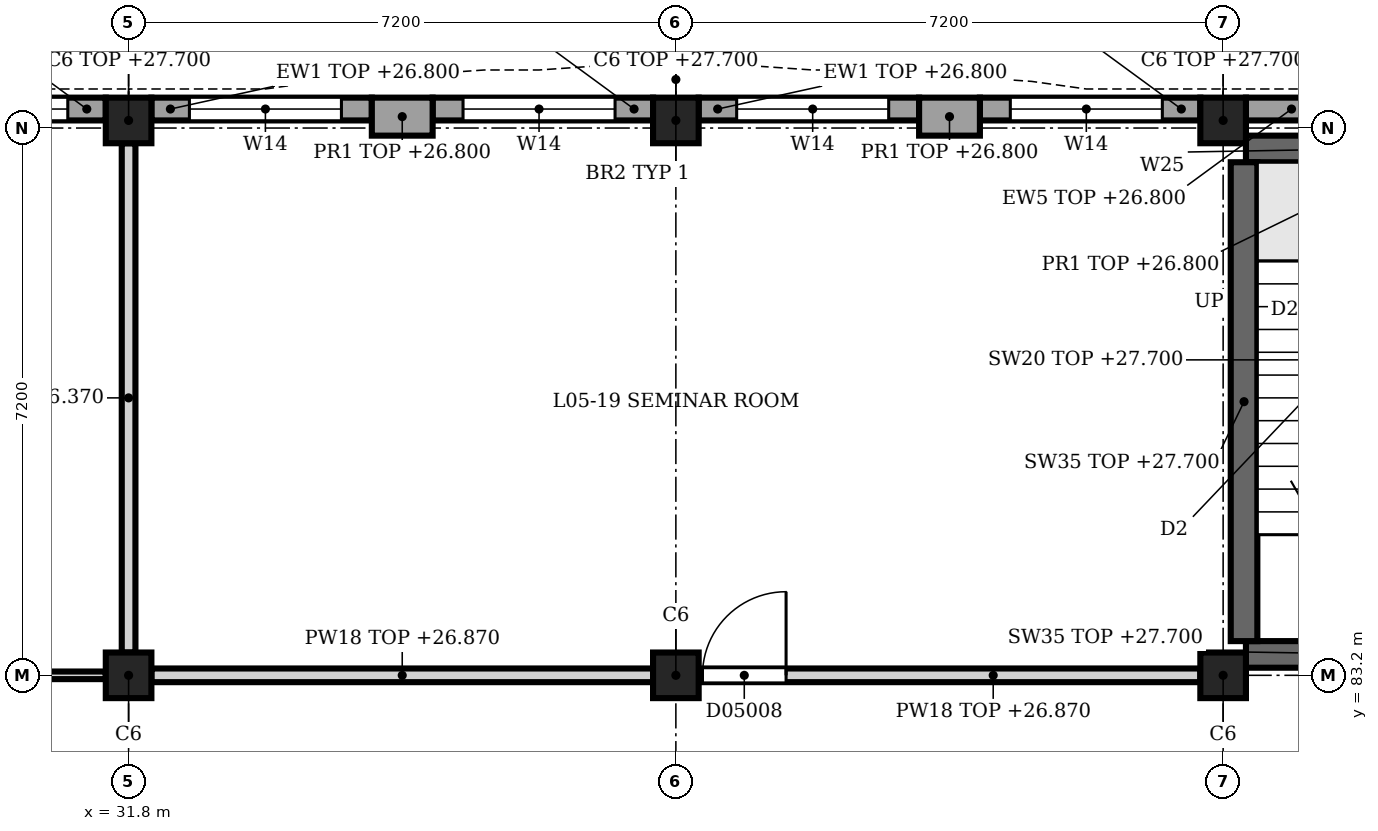
"""IFC4 building model, lengths in metres.
Left out: names, types, materials, properties, quantities, classifications, styles, units other than length and angle.
Written with IfcOpenShell. Run it as: python <this file> out.ifc"""

import sys

from ifc_helpers import new_model, si_unit, direction, frame, frame_2d, origin, origin_2d, place, context, subcontext, project, spatial, rectangle, extrude, element, fill, save


model = new_model("IFC4")
c1 = context("Model", 3, precision=1e-05, world=origin(), true_north=direction((0.0, 1.0)))
c2 = subcontext(c1, "Body", "Model", "MODEL_VIEW")
j1 = project(units=[si_unit("LENGTHUNIT", "METRE"), si_unit("PLANEANGLEUNIT", "RADIAN")], contexts=[c1])
p1 = place(None, origin())
s1 = spatial("IfcSite", under=j1, at=p1, CompositionType="ELEMENT")
p2 = place(p1, origin())
s2 = spatial("IfcBuilding", under=s1, at=p2, CompositionType="ELEMENT")
p3 = place(p2, frame((0.0, 0.0, 23.4)))
s3 = spatial("IfcBuildingStorey", under=s2, at=p3, CompositionType="ELEMENT", Elevation=23.4)
p4 = place(p3, frame((31.8, 83.2, 0.0), z_axis=(0.0, 0.0, 1.0), x_axis=(1.0, 0.0, 0.0)))
e1 = element("IfcColumn", 1, at=p4, inside=s3, PredefinedType="COLUMN", context=c2, shape_type="SweptSolid", body=[
    extrude(rectangle(XDim=0.6, YDim=0.6, at=origin_2d()), origin(), (0.0, 0.0, 1.0), 4.5),
])
p5 = place(p3, frame((31.8, 90.5, 0.0), z_axis=(0.0, 0.0, 1.0), x_axis=(1.0, 0.0, 0.0)))
e2 = element("IfcColumn", 2, at=p5, inside=s3, PredefinedType="COLUMN", context=c2, shape_type="SweptSolid", body=[
    extrude(rectangle(XDim=0.6, YDim=0.6, at=origin_2d()), origin(), (0.0, 0.0, 1.0), 4.3),
])
p6 = place(p3, frame((39.0, 83.2, 0.0), z_axis=(0.0, 0.0, 1.0), x_axis=(1.0, 0.0, 0.0)))
e3 = element("IfcColumn", 3, at=p6, inside=s3, PredefinedType="COLUMN", context=c2, shape_type="SweptSolid", body=[
    extrude(rectangle(XDim=0.6, YDim=0.6, at=origin_2d()), origin(), (0.0, 0.0, 1.0), 4.5),
])
p7 = place(p3, frame((39.0, 90.5, 0.0), z_axis=(0.0, 0.0, 1.0), x_axis=(1.0, 0.0, 0.0)))
e4 = element("IfcColumn", 4, at=p7, inside=s3, PredefinedType="COLUMN", context=c2, shape_type="SweptSolid", body=[
    extrude(rectangle(XDim=0.6, YDim=0.6, at=origin_2d()), origin(), (0.0, 0.0, 1.0), 4.3),
])
p8 = place(p3, frame((46.2, 83.2, 0.0), z_axis=(0.0, 0.0, 1.0), x_axis=(1.0, 0.0, 0.0)))
e5 = element("IfcColumn", 5, at=p8, inside=s3, PredefinedType="COLUMN", context=c2, shape_type="SweptSolid", body=[
    extrude(rectangle(XDim=0.6, YDim=0.6, at=origin_2d()), origin(), (0.0, 0.0, 1.0), 4.5),
])
p9 = place(p3, frame((46.2, 90.5, 0.0), z_axis=(0.0, 0.0, 1.0), x_axis=(1.0, 0.0, 0.0)))
e6 = element("IfcColumn", 6, at=p9, inside=s3, PredefinedType="COLUMN", context=c2, shape_type="SweptSolid", body=[
    extrude(rectangle(XDim=0.6, YDim=0.6, at=origin_2d()), origin(), (0.0, 0.0, 1.0), 4.3),
])
for number, where, z_axis, x_axis in (
    (7, (35.0, 90.55, 0.0), (0.0, 0.0, 1.0), (1.0, 0.0, 0.0)),
    (8, (42.2, 90.55, 0.0), (0.0, 0.0, 1.0), (1.0, 0.0, 0.0)),
):
    element("IfcWall", number, at=place(p3, frame(where, z_axis=z_axis, x_axis=x_axis)), inside=s3, PredefinedType="SOLIDWALL", context=c2, shape_type="SweptSolid", body=[
        extrude(rectangle(XDim=0.8, YDim=0.5, at=frame_2d((0.4, 0.0))), origin(), (0.0, 0.0, 1.0), 3.4),
    ])
p10 = place(p3, frame((28.6, 90.65, 0.0), z_axis=(0.0, 0.0, 1.0), x_axis=(1.0, 0.0, 0.0)))
e9 = element("IfcWall", 9, at=p10, inside=s3, PredefinedType="SOLIDWALL", context=c2, shape_type="SweptSolid", body=[
    extrude(rectangle(XDim=2.9, YDim=0.3, at=frame_2d((1.45, 0.0))), origin(), (0.0, 0.0, 1.0), 3.4),
])
p11 = place(p10, frame((0.4, 0.0, 0.9)))
e10 = element("IfcOpeningElement", 10, at=p11, cuts=e9, PredefinedType="OPENING", context=c2, shape_type="SweptSolid", body=[
    extrude(rectangle(XDim=2.0, YDim=2.4, at=frame_2d((1.0, 1.2))), frame((0.0, 0.16, 0.0), z_axis=(0.0, -1.0, 0.0), x_axis=(1.0, 0.0, 0.0)), (0.0, 0.0, 1.0), 0.32),
])
p12 = place(p3, frame((32.1, 90.65, 0.0), z_axis=(0.0, 0.0, 1.0), x_axis=(1.0, 0.0, 0.0)))
e11 = element("IfcWall", 11, at=p12, inside=s3, PredefinedType="SOLIDWALL", context=c2, shape_type="SweptSolid", body=[
    extrude(rectangle(XDim=2.9, YDim=0.3, at=frame_2d((1.45, 0.0))), origin(), (0.0, 0.0, 1.0), 3.4),
])
p13 = place(p12, frame((0.5, 0.0, 0.9)))
e12 = element("IfcOpeningElement", 12, at=p13, cuts=e11, PredefinedType="OPENING", context=c2, shape_type="SweptSolid", body=[
    extrude(rectangle(XDim=2.0, YDim=2.4, at=frame_2d((1.0, 1.2))), frame((0.0, 0.16, 0.0), z_axis=(0.0, -1.0, 0.0), x_axis=(1.0, 0.0, 0.0)), (0.0, 0.0, 1.0), 0.32),
])
p14 = place(p3, frame((35.8, 90.65, 0.0), z_axis=(0.0, 0.0, 1.0), x_axis=(1.0, 0.0, 0.0)))
e13 = element("IfcWall", 13, at=p14, inside=s3, PredefinedType="SOLIDWALL", context=c2, shape_type="SweptSolid", body=[
    extrude(rectangle(XDim=2.9, YDim=0.3, at=frame_2d((1.45, 0.0))), origin(), (0.0, 0.0, 1.0), 3.4),
])
p15 = place(p14, frame((0.4, 0.0, 0.9)))
e14 = element("IfcOpeningElement", 14, at=p15, cuts=e13, PredefinedType="OPENING", context=c2, shape_type="SweptSolid", body=[
    extrude(rectangle(XDim=2.0, YDim=2.4, at=frame_2d((1.0, 1.2))), frame((0.0, 0.16, 0.0), z_axis=(0.0, -1.0, 0.0), x_axis=(1.0, 0.0, 0.0)), (0.0, 0.0, 1.0), 0.32),
])
p16 = place(p3, frame((39.3, 90.65, 0.0), z_axis=(0.0, 0.0, 1.0), x_axis=(1.0, 0.0, 0.0)))
e15 = element("IfcWall", 15, at=p16, inside=s3, PredefinedType="SOLIDWALL", context=c2, shape_type="SweptSolid", body=[
    extrude(rectangle(XDim=2.9, YDim=0.3, at=frame_2d((1.45, 0.0))), origin(), (0.0, 0.0, 1.0), 3.4),
])
p17 = place(p16, frame((0.5, 0.0, 0.9)))
e16 = element("IfcOpeningElement", 16, at=p17, cuts=e15, PredefinedType="OPENING", context=c2, shape_type="SweptSolid", body=[
    extrude(rectangle(XDim=2.0, YDim=2.4, at=frame_2d((1.0, 1.2))), frame((0.0, 0.16, 0.0), z_axis=(0.0, -1.0, 0.0), x_axis=(1.0, 0.0, 0.0)), (0.0, 0.0, 1.0), 0.32),
])
p18 = place(p3, frame((43.0, 90.65, 0.0), z_axis=(0.0, 0.0, 1.0), x_axis=(1.0, 0.0, 0.0)))
e17 = element("IfcWall", 17, at=p18, inside=s3, PredefinedType="SOLIDWALL", context=c2, shape_type="SweptSolid", body=[
    extrude(rectangle(XDim=2.9, YDim=0.3, at=frame_2d((1.45, 0.0))), origin(), (0.0, 0.0, 1.0), 3.4),
])
p19 = place(p18, frame((0.4, 0.0, 0.9)))
e18 = element("IfcOpeningElement", 18, at=p19, cuts=e17, PredefinedType="OPENING", context=c2, shape_type="SweptSolid", body=[
    extrude(rectangle(XDim=2.0, YDim=2.4, at=frame_2d((1.0, 1.2))), frame((0.0, 0.16, 0.0), z_axis=(0.0, -1.0, 0.0), x_axis=(1.0, 0.0, 0.0)), (0.0, 0.0, 1.0), 0.32),
])
p20 = place(p3, frame((46.5, 90.65, 0.0), z_axis=(0.0, 0.0, 1.0), x_axis=(1.0, 0.0, 0.0)))
e19 = element("IfcWall", 19, at=p20, inside=s3, PredefinedType="SOLIDWALL", context=c2, shape_type="SweptSolid", body=[
    extrude(rectangle(XDim=2.9, YDim=0.3, at=frame_2d((1.45, 0.0))), origin(), (0.0, 0.0, 1.0), 3.4),
])
p21 = place(p20, frame((1.2, 0.0, 1.2)))
e20 = element("IfcOpeningElement", 20, at=p21, cuts=e19, PredefinedType="OPENING", context=c2, shape_type="SweptSolid", body=[
    extrude(rectangle(XDim=0.6, YDim=1.8, at=frame_2d((0.3, 0.9))), frame((0.0, 0.16, 0.0), z_axis=(0.0, -1.0, 0.0), x_axis=(1.0, 0.0, 0.0)), (0.0, 0.0, 1.0), 0.32),
])
p22 = place(p3, frame((46.5, 83.475, 0.0), z_axis=(0.0, 0.0, 1.0), x_axis=(1.0, 0.0, 0.0)))
e21 = element("IfcWall", 21, at=p22, inside=s3, PredefinedType="SHEAR", context=c2, shape_type="SweptSolid", body=[
    extrude(rectangle(XDim=6.6, YDim=0.35, at=frame_2d((3.3, 0.0))), origin(), (0.0, 0.0, 1.0), 4.3),
])
p23 = place(p22, frame((3.9, 0.0, 0.0)))
e22 = element("IfcOpeningElement", 22, at=p23, cuts=e21, PredefinedType="OPENING", context=c2, shape_type="SweptSolid", body=[
    extrude(rectangle(XDim=1.2, YDim=2.1, at=frame_2d((0.6, 1.05))), frame((0.0, 0.185, 0.0), z_axis=(0.0, -1.0, 0.0), x_axis=(1.0, 0.0, 0.0)), (0.0, 0.0, 1.0), 0.37),
])
p24 = place(p3, frame((46.5, 90.125, 0.0), z_axis=(0.0, 0.0, 1.0), x_axis=(1.0, 0.0, 0.0)))
e23 = element("IfcWall", 23, at=p24, inside=s3, PredefinedType="SHEAR", context=c2, shape_type="SweptSolid", body=[
    extrude(rectangle(XDim=6.6, YDim=0.35, at=frame_2d((3.3, 0.0))), origin(), (0.0, 0.0, 1.0), 4.3),
])
p25 = place(p24, frame((1.2, 0.0, 1.2)))
e24 = element("IfcOpeningElement", 24, at=p25, cuts=e23, PredefinedType="OPENING", context=c2, shape_type="SweptSolid", body=[
    extrude(rectangle(XDim=0.6, YDim=1.8, at=frame_2d((0.3, 0.9))), frame((0.0, 0.185, 0.0), z_axis=(0.0, -1.0, 0.0), x_axis=(1.0, 0.0, 0.0)), (0.0, 0.0, 1.0), 0.37),
])
p26 = place(p3, frame((46.475, 83.65, 0.0), z_axis=(0.0, 0.0, 1.0), x_axis=(0.0, 1.0, 0.0)))
e25 = element("IfcWall", 25, at=p26, inside=s3, PredefinedType="SHEAR", context=c2, shape_type="SweptSolid", body=[
    extrude(rectangle(XDim=6.3, YDim=0.35, at=frame_2d((3.15, 0.0))), origin(), (0.0, 0.0, 1.0), 4.3),
])
p27 = place(p3, frame((24.9, 83.2, 0.0), z_axis=(0.0, 0.0, 1.0), x_axis=(1.0, 0.0, 0.0)))
e26 = element("IfcWall", 26, at=p27, inside=s3, PredefinedType="PARTITIONING", context=c2, shape_type="SweptSolid", body=[
    extrude(rectangle(XDim=6.6, YDim=0.1, at=frame_2d((3.3, 0.0))), origin(), (0.0, 0.0, 1.0), 3.47),
])
p28 = place(p27, frame((0.05, 0.0, 0.0)))
e27 = element("IfcOpeningElement", 27, at=p28, cuts=e26, PredefinedType="OPENING", context=c2, shape_type="SweptSolid", body=[
    extrude(rectangle(XDim=1.0, YDim=2.1, at=frame_2d((0.5, 1.05))), frame((0.0, 0.06, 0.0), z_axis=(0.0, -1.0, 0.0), x_axis=(1.0, 0.0, 0.0)), (0.0, 0.0, 1.0), 0.12),
])
p29 = place(p3, frame((32.1, 83.2, 0.0), z_axis=(0.0, 0.0, 1.0), x_axis=(1.0, 0.0, 0.0)))
e28 = element("IfcWall", 28, at=p29, inside=s3, PredefinedType="PARTITIONING", context=c2, shape_type="SweptSolid", body=[
    extrude(rectangle(XDim=6.6, YDim=0.18, at=frame_2d((3.3, 0.0))), origin(), (0.0, 0.0, 1.0), 3.47),
])
p30 = place(p3, frame((39.3, 83.2, 0.0), z_axis=(0.0, 0.0, 1.0), x_axis=(1.0, 0.0, 0.0)))
e29 = element("IfcWall", 29, at=p30, inside=s3, PredefinedType="PARTITIONING", context=c2, shape_type="SweptSolid", body=[
    extrude(rectangle(XDim=6.6, YDim=0.18, at=frame_2d((3.3, 0.0))), origin(), (0.0, 0.0, 1.0), 3.47),
])
p31 = place(p30, frame((0.05, 0.0, 0.0)))
e30 = element("IfcOpeningElement", 30, at=p31, cuts=e29, PredefinedType="OPENING", context=c2, shape_type="SweptSolid", body=[
    extrude(rectangle(XDim=1.1, YDim=2.3, at=frame_2d((0.55, 1.15))), frame((0.0, 0.1, 0.0), z_axis=(0.0, -1.0, 0.0), x_axis=(1.0, 0.0, 0.0)), (0.0, 0.0, 1.0), 0.2),
])
p32 = place(p3, frame((31.8, 83.5, 0.0), z_axis=(0.0, 0.0, 1.0), x_axis=(0.0, 1.0, 0.0)))
e31 = element("IfcWall", 31, at=p32, inside=s3, PredefinedType="PARTITIONING", context=c2, shape_type="SweptSolid", body=[
    extrude(rectangle(XDim=6.7, YDim=0.18, at=frame_2d((3.35, 0.0))), origin(), (0.0, 0.0, 1.0), 2.97),
])
p33 = place(p11, origin())
e32 = element("IfcWindow", 32, at=p33, inside=s3, PartitioningType="SINGLE_PANEL", PredefinedType="WINDOW", context=c2, shape_type="SweptSolid", body=[
    extrude(rectangle(XDim=2.0, YDim=2.4, at=frame_2d((1.0, 1.2))), frame((0.0, 0.03, 0.0), z_axis=(0.0, -1.0, 0.0), x_axis=(1.0, 0.0, 0.0)), (0.0, 0.0, 1.0), 0.06),
])
fill(e10, e32)
p34 = place(p13, origin())
e33 = element("IfcWindow", 33, at=p34, inside=s3, PartitioningType="SINGLE_PANEL", PredefinedType="WINDOW", context=c2, shape_type="SweptSolid", body=[
    extrude(rectangle(XDim=2.0, YDim=2.4, at=frame_2d((1.0, 1.2))), frame((0.0, 0.03, 0.0), z_axis=(0.0, -1.0, 0.0), x_axis=(1.0, 0.0, 0.0)), (0.0, 0.0, 1.0), 0.06),
])
fill(e12, e33)
p35 = place(p15, origin())
e34 = element("IfcWindow", 34, at=p35, inside=s3, PartitioningType="SINGLE_PANEL", PredefinedType="WINDOW", context=c2, shape_type="SweptSolid", body=[
    extrude(rectangle(XDim=2.0, YDim=2.4, at=frame_2d((1.0, 1.2))), frame((0.0, 0.03, 0.0), z_axis=(0.0, -1.0, 0.0), x_axis=(1.0, 0.0, 0.0)), (0.0, 0.0, 1.0), 0.06),
])
fill(e14, e34)
p36 = place(p17, origin())
e35 = element("IfcWindow", 35, at=p36, inside=s3, PartitioningType="SINGLE_PANEL", PredefinedType="WINDOW", context=c2, shape_type="SweptSolid", body=[
    extrude(rectangle(XDim=2.0, YDim=2.4, at=frame_2d((1.0, 1.2))), frame((0.0, 0.03, 0.0), z_axis=(0.0, -1.0, 0.0), x_axis=(1.0, 0.0, 0.0)), (0.0, 0.0, 1.0), 0.06),
])
fill(e16, e35)
p37 = place(p19, origin())
e36 = element("IfcWindow", 36, at=p37, inside=s3, PartitioningType="SINGLE_PANEL", PredefinedType="WINDOW", context=c2, shape_type="SweptSolid", body=[
    extrude(rectangle(XDim=2.0, YDim=2.4, at=frame_2d((1.0, 1.2))), frame((0.0, 0.03, 0.0), z_axis=(0.0, -1.0, 0.0), x_axis=(1.0, 0.0, 0.0)), (0.0, 0.0, 1.0), 0.06),
])
fill(e18, e36)
p38 = place(p31, origin())
e37 = element("IfcDoor", 37, at=p38, inside=s3, OperationType="SINGLE_SWING_LEFT", PredefinedType="DOOR", context=c2, shape_type="SweptSolid", body=[
    extrude(rectangle(XDim=1.1, YDim=2.3, at=frame_2d((0.55, 1.15))), frame((0.0, 0.025, 0.0), z_axis=(0.0, -1.0, 0.0), x_axis=(1.0, 0.0, 0.0)), (0.0, 0.0, 1.0), 0.05),
])
fill(e30, e37)
save(model, sys.argv[1])
